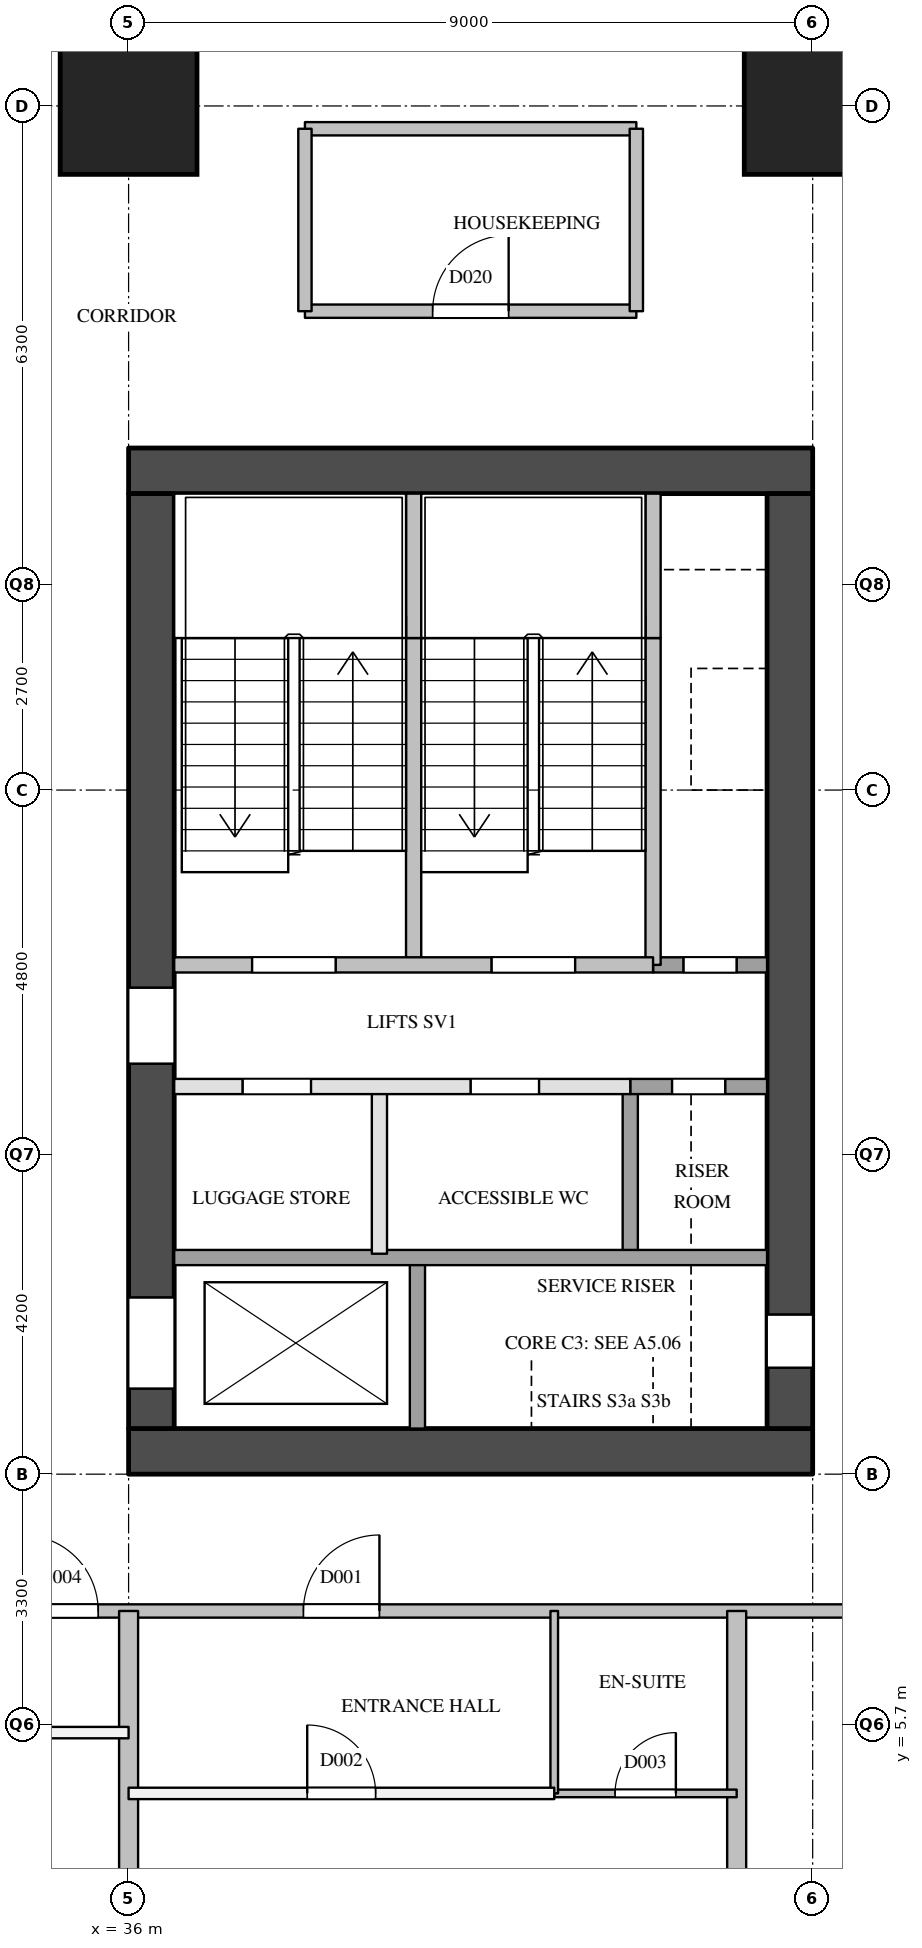
"""IFC4 building model, lengths in metres.
Left out: names, types, materials, properties, quantities, classifications, styles, units other than length and angle.
Written with IfcOpenShell. Run it as: python <this file> out.ifc"""

import sys

from ifc_helpers import new_model, si_unit, direction, frame, frame_2d, origin, origin_2d, place, context, subcontext, project, spatial, rectangle, extrude, element, fill, save


model = new_model("IFC4")
c1 = context("Model", 3, precision=1e-05, world=origin(), true_north=direction((0.0, 1.0)))
c2 = subcontext(c1, "Body", "Model", "MODEL_VIEW")
j1 = project(units=[si_unit("LENGTHUNIT", "METRE"), si_unit("PLANEANGLEUNIT", "RADIAN")], contexts=[c1])
p1 = place(None, origin())
s1 = spatial("IfcSite", under=j1, at=p1, CompositionType="ELEMENT")
p2 = place(p1, origin())
s2 = spatial("IfcBuilding", under=s1, at=p2, CompositionType="ELEMENT")
p3 = place(p2, frame((0.0, 0.0, 108.2)))
s3 = spatial("IfcBuildingStorey", under=s2, at=p3, CompositionType="ELEMENT", Elevation=108.2)
for number, where, z_axis, x_axis in (
    (1, (36.0, 27.0, 0.0), (0.0, 0.0, 1.0), (1.0, 0.0, 0.0)),
    (2, (45.0, 27.0, 0.0), (0.0, 0.0, 1.0), (1.0, 0.0, 0.0)),
):
    element("IfcColumn", number, at=place(p3, frame(where, z_axis=z_axis, x_axis=x_axis)), inside=s3, PredefinedType="COLUMN", context=c2, shape_type="SweptSolid", body=[
        extrude(rectangle(XDim=1.8, YDim=1.8, at=origin_2d()), origin(), (0.0, 0.0, 1.0), 3.8),
    ])
for number, where, z_axis, x_axis in (
    (3, (36.0, 9.3, 0.0), (0.0, 0.0, 1.0), (1.0, 0.0, 0.0)),
    (4, (36.0, 22.2, 0.0), (0.0, 0.0, 1.0), (1.0, 0.0, 0.0)),
):
    element("IfcWall", number, at=place(p3, frame(where, z_axis=z_axis, x_axis=x_axis)), inside=s3, PredefinedType="SHEAR", context=c2, shape_type="SweptSolid", body=[
        extrude(rectangle(XDim=9.0, YDim=0.6, at=frame_2d((4.5, 0.0))), origin(), (0.0, 0.0, 1.0), 3.5),
    ])
p4 = place(p3, frame((36.3, 9.6, 0.0), z_axis=(0.0, 0.0, 1.0), x_axis=(0.0, 1.0, 0.0)))
e5 = element("IfcWall", 5, at=p4, inside=s3, PredefinedType="SHEAR", context=c2, shape_type="SweptSolid", body=[
    extrude(rectangle(XDim=12.3, YDim=0.6, at=frame_2d((6.15, 0.0))), origin(), (0.0, 0.0, 1.0), 3.5),
])
p5 = place(p4, frame((0.525, 0.0, 0.0)))
e6 = element("IfcOpeningElement", 6, at=p5, cuts=e5, PredefinedType="OPENING", context=c2, shape_type="SweptSolid", body=[
    extrude(rectangle(XDim=1.2, YDim=2.1, at=frame_2d((0.6, 1.05))), frame((0.0, 0.31, 0.0), z_axis=(0.0, -1.0, 0.0), x_axis=(1.0, 0.0, 0.0)), (0.0, 0.0, 1.0), 0.62),
])
p6 = place(p4, frame((4.8, 0.0, 0.0)))
e7 = element("IfcOpeningElement", 7, at=p6, cuts=e5, PredefinedType="OPENING", context=c2, shape_type="SweptSolid", body=[
    extrude(rectangle(XDim=1.0, YDim=2.1, at=frame_2d((0.5, 1.05))), frame((0.0, 0.31, 0.0), z_axis=(0.0, -1.0, 0.0), x_axis=(1.0, 0.0, 0.0)), (0.0, 0.0, 1.0), 0.62),
])
p7 = place(p3, frame((44.7, 9.6, 0.0), z_axis=(0.0, 0.0, 1.0), x_axis=(0.0, 1.0, 0.0)))
e8 = element("IfcWall", 8, at=p7, inside=s3, PredefinedType="SHEAR", context=c2, shape_type="SweptSolid", body=[
    extrude(rectangle(XDim=12.3, YDim=0.6, at=frame_2d((6.15, 0.0))), origin(), (0.0, 0.0, 1.0), 3.5),
])
p8 = place(p7, frame((0.8, 0.0, 0.0)))
e9 = element("IfcOpeningElement", 9, at=p8, cuts=e8, PredefinedType="OPENING", context=c2, shape_type="SweptSolid", body=[
    extrude(rectangle(XDim=0.7, YDim=2.1, at=frame_2d((0.35, 1.05))), frame((0.0, 0.31, 0.0), z_axis=(0.0, -1.0, 0.0), x_axis=(1.0, 0.0, 0.0)), (0.0, 0.0, 1.0), 0.62),
])
p9 = place(p3, frame((39.3, 11.9, 0.0), z_axis=(0.0, 0.0, 1.0), x_axis=(0.0, 1.0, 0.0)))
e10 = element("IfcWall", 10, at=p9, inside=s3, PredefinedType="PARTITIONING", context=c2, shape_type="SweptSolid", body=[
    extrude(rectangle(XDim=2.2, YDim=0.2, at=frame_2d((1.1, 0.0))), origin(), (0.0, 0.0, 1.0), 3.5),
])
p10 = place(p3, frame((39.75, 15.7, 0.0), z_axis=(0.0, 0.0, 1.0), x_axis=(0.0, 1.0, 0.0)))
e11 = element("IfcWall", 11, at=p10, inside=s3, PredefinedType="SOLIDWALL", context=c2, shape_type="SweptSolid", body=[
    extrude(rectangle(XDim=4.3, YDim=0.2, at=frame_2d((2.15, 0.0))), origin(), (0.0, 0.0, 1.0), 3.5),
])
p11 = place(p3, frame((39.75, 20.0, 0.0), z_axis=(0.0, 0.0, 1.0), x_axis=(0.0, 1.0, 0.0)))
e12 = element("IfcWall", 12, at=p11, inside=s3, PredefinedType="SOLIDWALL", context=c2, shape_type="SweptSolid", body=[
    extrude(rectangle(XDim=1.9, YDim=0.2, at=frame_2d((0.95, 0.0))), origin(), (0.0, 0.0, 1.0), 3.5),
])
p12 = place(p3, frame((39.8, 9.6, 0.0), z_axis=(0.0, 0.0, 1.0), x_axis=(0.0, 1.0, 0.0)))
e13 = element("IfcWall", 13, at=p12, inside=s3, PredefinedType="SOLIDWALL", context=c2, shape_type="SweptSolid", body=[
    extrude(rectangle(XDim=2.3, YDim=0.2, at=frame_2d((1.15, 0.0))), origin(), (0.0, 0.0, 1.0), 3.5),
])
p13 = place(p3, frame((42.6, 11.9, 0.0), z_axis=(0.0, 0.0, 1.0), x_axis=(0.0, 1.0, 0.0)))
e14 = element("IfcWall", 14, at=p13, inside=s3, PredefinedType="SOLIDWALL", context=c2, shape_type="SweptSolid", body=[
    extrude(rectangle(XDim=2.2, YDim=0.2, at=frame_2d((1.1, 0.0))), origin(), (0.0, 0.0, 1.0), 3.5),
])
p14 = place(p3, frame((42.9, 15.7, 0.0), z_axis=(0.0, 0.0, 1.0), x_axis=(0.0, 1.0, 0.0)))
e15 = element("IfcWall", 15, at=p14, inside=s3, PredefinedType="SOLIDWALL", context=c2, shape_type="SweptSolid", body=[
    extrude(rectangle(XDim=4.3, YDim=0.2, at=frame_2d((2.15, 0.0))), origin(), (0.0, 0.0, 1.0), 3.5),
])
p15 = place(p3, frame((42.9, 20.0, 0.0), z_axis=(0.0, 0.0, 1.0), x_axis=(0.0, 1.0, 0.0)))
e16 = element("IfcWall", 16, at=p15, inside=s3, PredefinedType="SOLIDWALL", context=c2, shape_type="SweptSolid", body=[
    extrude(rectangle(XDim=1.9, YDim=0.2, at=frame_2d((0.95, 0.0))), origin(), (0.0, 0.0, 1.0), 3.5),
])
p16 = place(p3, frame((36.6, 11.85, 0.0), z_axis=(0.0, 0.0, 1.0), x_axis=(1.0, 0.0, 0.0)))
e17 = element("IfcWall", 17, at=p16, inside=s3, PredefinedType="SOLIDWALL", context=c2, shape_type="SweptSolid", body=[
    extrude(rectangle(XDim=7.8, YDim=0.2, at=frame_2d((3.9, 0.0))), origin(), (0.0, 0.0, 1.0), 3.5),
])
p17 = place(p3, frame((36.6, 14.1, 0.0), z_axis=(0.0, 0.0, 1.0), x_axis=(1.0, 0.0, 0.0)))
e18 = element("IfcWall", 18, at=p17, inside=s3, PredefinedType="PARTITIONING", context=c2, shape_type="SweptSolid", body=[
    extrude(rectangle(XDim=6.0, YDim=0.2, at=frame_2d((3.0, 0.0))), origin(), (0.0, 0.0, 1.0), 3.5),
])
p18 = place(p17, frame((0.9, 0.0, 0.0)))
e19 = element("IfcOpeningElement", 19, at=p18, cuts=e18, PredefinedType="OPENING", context=c2, shape_type="SweptSolid", body=[
    extrude(rectangle(XDim=0.9, YDim=2.1, at=frame_2d((0.45, 1.05))), frame((0.0, 0.11, 0.0), z_axis=(0.0, -1.0, 0.0), x_axis=(1.0, 0.0, 0.0)), (0.0, 0.0, 1.0), 0.22),
])
p19 = place(p17, frame((3.9, 0.0, 0.0)))
e20 = element("IfcOpeningElement", 20, at=p19, cuts=e18, PredefinedType="OPENING", context=c2, shape_type="SweptSolid", body=[
    extrude(rectangle(XDim=0.9, YDim=2.1, at=frame_2d((0.45, 1.05))), frame((0.0, 0.11, 0.0), z_axis=(0.0, -1.0, 0.0), x_axis=(1.0, 0.0, 0.0)), (0.0, 0.0, 1.0), 0.22),
])
p20 = place(p3, frame((42.6, 14.1, 0.0), z_axis=(0.0, 0.0, 1.0), x_axis=(1.0, 0.0, 0.0)))
e21 = element("IfcWall", 21, at=p20, inside=s3, PredefinedType="SOLIDWALL", context=c2, shape_type="SweptSolid", body=[
    extrude(rectangle(XDim=1.8, YDim=0.2, at=frame_2d((0.9, 0.0))), origin(), (0.0, 0.0, 1.0), 3.5),
])
p21 = place(p20, frame((0.55, 0.0, 0.0)))
e22 = element("IfcOpeningElement", 22, at=p21, cuts=e21, PredefinedType="OPENING", context=c2, shape_type="SweptSolid", body=[
    extrude(rectangle(XDim=0.7, YDim=2.1, at=frame_2d((0.35, 1.05))), frame((0.0, 0.11, 0.0), z_axis=(0.0, -1.0, 0.0), x_axis=(1.0, 0.0, 0.0)), (0.0, 0.0, 1.0), 0.22),
])
p22 = place(p3, frame((42.9, 15.7, 0.0), z_axis=(0.0, 0.0, 1.0), x_axis=(1.0, 0.0, 0.0)))
e23 = element("IfcWall", 23, at=p22, inside=s3, PredefinedType="SOLIDWALL", context=c2, shape_type="SweptSolid", body=[
    extrude(rectangle(XDim=1.5, YDim=0.2, at=frame_2d((0.75, 0.0))), origin(), (0.0, 0.0, 1.0), 3.5),
])
p23 = place(p22, frame((0.4, 0.0, 0.0)))
e24 = element("IfcOpeningElement", 24, at=p23, cuts=e23, PredefinedType="OPENING", context=c2, shape_type="SweptSolid", body=[
    extrude(rectangle(XDim=0.7, YDim=2.1, at=frame_2d((0.35, 1.05))), frame((0.0, 0.11, 0.0), z_axis=(0.0, -1.0, 0.0), x_axis=(1.0, 0.0, 0.0)), (0.0, 0.0, 1.0), 0.22),
])
p24 = place(p3, frame((36.6, 15.7, 0.0), z_axis=(0.0, 0.0, 1.0), x_axis=(1.0, 0.0, 0.0)))
e25 = element("IfcWall", 25, at=p24, inside=s3, PredefinedType="SOLIDWALL", context=c2, shape_type="SweptSolid", body=[
    extrude(rectangle(XDim=6.3, YDim=0.2, at=frame_2d((3.15, 0.0))), origin(), (0.0, 0.0, 1.0), 3.5),
])
p25 = place(p24, frame((1.025, 0.0, 0.0)))
e26 = element("IfcOpeningElement", 26, at=p25, cuts=e25, PredefinedType="OPENING", context=c2, shape_type="SweptSolid", body=[
    extrude(rectangle(XDim=1.1, YDim=2.1, at=frame_2d((0.55, 1.05))), frame((0.0, 0.11, 0.0), z_axis=(0.0, -1.0, 0.0), x_axis=(1.0, 0.0, 0.0)), (0.0, 0.0, 1.0), 0.22),
])
p26 = place(p24, frame((4.175, 0.0, 0.0)))
e27 = element("IfcOpeningElement", 27, at=p26, cuts=e25, PredefinedType="OPENING", context=c2, shape_type="SweptSolid", body=[
    extrude(rectangle(XDim=1.1, YDim=2.1, at=frame_2d((0.55, 1.05))), frame((0.0, 0.11, 0.0), z_axis=(0.0, -1.0, 0.0), x_axis=(1.0, 0.0, 0.0)), (0.0, 0.0, 1.0), 0.22),
])
p27 = place(p3, frame((34.2, 7.2, 0.0), z_axis=(0.0, 0.0, 1.0), x_axis=(1.0, 0.0, 0.0)))
e28 = element("IfcWall", 28, at=p27, inside=s3, PredefinedType="PARTITIONING", context=c2, shape_type="SweptSolid", body=[
    extrude(rectangle(XDim=12.6, YDim=0.175, at=frame_2d((6.3, 0.0))), origin(), (0.0, 0.0, 1.0), 3.5),
])
p28 = place(p27, frame((4.1, 0.0, 0.0)))
e29 = element("IfcOpeningElement", 29, at=p28, cuts=e28, PredefinedType="OPENING", context=c2, shape_type="SweptSolid", body=[
    extrude(rectangle(XDim=1.0, YDim=2.1, at=frame_2d((0.5, 1.05))), frame((0.0, 0.097, 0.0), z_axis=(0.0, -1.0, 0.0), x_axis=(1.0, 0.0, 0.0)), (0.0, 0.0, 1.0), 0.195),
])
p29 = place(p27, frame((0.4, 0.0, 0.0)))
e30 = element("IfcOpeningElement", 30, at=p29, cuts=e28, PredefinedType="OPENING", context=c2, shape_type="SweptSolid", body=[
    extrude(rectangle(XDim=1.0, YDim=2.1, at=frame_2d((0.5, 1.05))), frame((0.0, 0.097, 0.0), z_axis=(0.0, -1.0, 0.0), x_axis=(1.0, 0.0, 0.0)), (0.0, 0.0, 1.0), 0.195),
])
p30 = place(p3, frame((38.32, 24.3, 0.0), z_axis=(0.0, 0.0, 1.0), x_axis=(1.0, 0.0, 0.0)))
e31 = element("IfcWall", 31, at=p30, inside=s3, PredefinedType="PARTITIONING", context=c2, shape_type="SweptSolid", body=[
    extrude(rectangle(XDim=4.36, YDim=0.175, at=frame_2d((2.18, 0.0))), origin(), (0.0, 0.0, 1.0), 3.5),
])
p31 = place(p30, frame((1.68, 0.0, 0.0)))
e32 = element("IfcOpeningElement", 32, at=p31, cuts=e31, PredefinedType="OPENING", context=c2, shape_type="SweptSolid", body=[
    extrude(rectangle(XDim=1.0, YDim=2.1, at=frame_2d((0.5, 1.05))), frame((0.0, 0.097, 0.0), z_axis=(0.0, -1.0, 0.0), x_axis=(1.0, 0.0, 0.0)), (0.0, 0.0, 1.0), 0.195),
])
p32 = place(p3, frame((38.32, 26.7, 0.0), z_axis=(0.0, 0.0, 1.0), x_axis=(1.0, 0.0, 0.0)))
e33 = element("IfcWall", 33, at=p32, inside=s3, PredefinedType="PARTITIONING", context=c2, shape_type="SweptSolid", body=[
    extrude(rectangle(XDim=4.36, YDim=0.175, at=frame_2d((2.18, 0.0))), origin(), (0.0, 0.0, 1.0), 2.5),
])
for number, where, z_axis, x_axis in (
    (34, (38.32, 24.3, 0.0), (0.0, 0.0, 1.0), (0.0, 1.0, 0.0)),
    (35, (42.68, 24.3, 0.0), (0.0, 0.0, 1.0), (0.0, 1.0, 0.0)),
):
    element("IfcWall", number, at=place(p3, frame(where, z_axis=z_axis, x_axis=x_axis)), inside=s3, PredefinedType="PARTITIONING", context=c2, shape_type="SweptSolid", body=[
        extrude(rectangle(XDim=2.4, YDim=0.175, at=frame_2d((1.2, 0.0))), origin(), (0.0, 0.0, 1.0), 2.5),
    ])
p33 = place(p3, frame((36.0, 4.8, 0.0), z_axis=(0.0, 0.0, 1.0), x_axis=(1.0, 0.0, 0.0)))
e36 = element("IfcWall", 36, at=p33, inside=s3, PredefinedType="PARTITIONING", context=c2, shape_type="SweptSolid", body=[
    extrude(rectangle(XDim=5.6, YDim=0.15, at=frame_2d((2.8, 0.0))), origin(), (0.0, 0.0, 1.0), 3.5),
])
p34 = place(p33, frame((2.35, 0.0, 0.0)))
e37 = element("IfcOpeningElement", 37, at=p34, cuts=e36, PredefinedType="OPENING", context=c2, shape_type="SweptSolid", body=[
    extrude(rectangle(XDim=0.9, YDim=2.1, at=frame_2d((0.45, 1.05))), frame((0.0, 0.085, 0.0), z_axis=(0.0, -1.0, 0.0), x_axis=(1.0, 0.0, 0.0)), (0.0, 0.0, 1.0), 0.17),
])
p35 = place(p3, frame((29.4, 5.6, 0.0), z_axis=(0.0, 0.0, 1.0), x_axis=(1.0, 0.0, 0.0)))
e38 = element("IfcWall", 38, at=p35, inside=s3, PredefinedType="PARTITIONING", context=c2, shape_type="SweptSolid", body=[
    extrude(rectangle(XDim=6.6, YDim=0.15, at=frame_2d((3.3, 0.0))), origin(), (0.0, 0.0, 1.0), 3.5),
])
p36 = place(p35, frame((2.85, 0.0, 0.0)))
e39 = element("IfcOpeningElement", 39, at=p36, cuts=e38, PredefinedType="OPENING", context=c2, shape_type="SweptSolid", body=[
    extrude(rectangle(XDim=0.9, YDim=2.1, at=frame_2d((0.45, 1.05))), frame((0.0, 0.085, 0.0), z_axis=(0.0, -1.0, 0.0), x_axis=(1.0, 0.0, 0.0)), (0.0, 0.0, 1.0), 0.17),
])
p37 = place(p3, frame((36.0, 0.0, 0.0), z_axis=(0.0, 0.0, 1.0), x_axis=(0.0, 1.0, 0.0)))
e40 = element("IfcWall", 40, at=p37, inside=s3, PredefinedType="PARTITIONING", context=c2, shape_type="SweptSolid", body=[
    extrude(rectangle(XDim=7.2, YDim=0.25, at=frame_2d((3.6, 0.0))), origin(), (0.0, 0.0, 1.0), 3.5),
])
p38 = place(p3, frame((44.0, 0.0, 0.0), z_axis=(0.0, 0.0, 1.0), x_axis=(0.0, 1.0, 0.0)))
e41 = element("IfcWall", 41, at=p38, inside=s3, PredefinedType="PARTITIONING", context=c2, shape_type="SweptSolid", body=[
    extrude(rectangle(XDim=7.2, YDim=0.25, at=frame_2d((3.6, 0.0))), origin(), (0.0, 0.0, 1.0), 2.5),
])
p39 = place(p3, frame((41.6, 4.8, 0.0), z_axis=(0.0, 0.0, 1.0), x_axis=(1.0, 0.0, 0.0)))
e42 = element("IfcWall", 42, at=p39, inside=s3, PredefinedType="PARTITIONING", context=c2, shape_type="SweptSolid", body=[
    extrude(rectangle(XDim=2.4, YDim=0.1, at=frame_2d((1.2, 0.0))), origin(), (0.0, 0.0, 1.0), 3.5),
])
p40 = place(p39, frame((0.8, 0.0, 0.0)))
e43 = element("IfcOpeningElement", 43, at=p40, cuts=e42, PredefinedType="OPENING", context=c2, shape_type="SweptSolid", body=[
    extrude(rectangle(XDim=0.8, YDim=2.1, at=frame_2d((0.4, 1.05))), frame((0.0, 0.06, 0.0), z_axis=(0.0, -1.0, 0.0), x_axis=(1.0, 0.0, 0.0)), (0.0, 0.0, 1.0), 0.12),
])
p41 = place(p3, frame((41.6, 4.8, 0.0), z_axis=(0.0, 0.0, 1.0), x_axis=(0.0, 1.0, 0.0)))
e44 = element("IfcWall", 44, at=p41, inside=s3, PredefinedType="PARTITIONING", context=c2, shape_type="SweptSolid", body=[
    extrude(rectangle(XDim=2.4, YDim=0.1, at=frame_2d((1.2, 0.0))), origin(), (0.0, 0.0, 1.0), 3.5),
])
p42 = place(p5, origin())
e45 = element("IfcDoor", 45, at=p42, inside=s3, OperationType="SLIDING_TO_LEFT", PredefinedType="DOOR", context=c2, shape_type="SweptSolid", body=[
    extrude(rectangle(XDim=1.2, YDim=2.1, at=frame_2d((0.6, 1.05))), frame((0.0, 0.025, 0.0), z_axis=(0.0, -1.0, 0.0), x_axis=(1.0, 0.0, 0.0)), (0.0, 0.0, 1.0), 0.05),
])
fill(e6, e45)
p43 = place(p25, origin())
e46 = element("IfcDoor", 46, at=p43, inside=s3, OperationType="SINGLE_SWING_LEFT", PredefinedType="DOOR", context=c2, shape_type="SweptSolid", body=[
    extrude(rectangle(XDim=1.1, YDim=2.1, at=frame_2d((0.55, 1.05))), frame((0.0, 0.025, 0.0), z_axis=(0.0, -1.0, 0.0), x_axis=(1.0, 0.0, 0.0)), (0.0, 0.0, 1.0), 0.05),
])
fill(e26, e46)
p44 = place(p26, origin())
e47 = element("IfcDoor", 47, at=p44, inside=s3, OperationType="SINGLE_SWING_RIGHT", PredefinedType="DOOR", context=c2, shape_type="SweptSolid", body=[
    extrude(rectangle(XDim=1.1, YDim=2.1, at=frame_2d((0.55, 1.05))), frame((0.0, 0.025, 0.0), z_axis=(0.0, -1.0, 0.0), x_axis=(1.0, 0.0, 0.0)), (0.0, 0.0, 1.0), 0.05),
])
fill(e27, e47)
p45 = place(p23, origin())
e48 = element("IfcDoor", 48, at=p45, inside=s3, OperationType="SINGLE_SWING_LEFT", PredefinedType="DOOR", context=c2, shape_type="SweptSolid", body=[
    extrude(rectangle(XDim=0.7, YDim=2.1, at=frame_2d((0.35, 1.05))), frame((0.0, 0.025, 0.0), z_axis=(0.0, -1.0, 0.0), x_axis=(1.0, 0.0, 0.0)), (0.0, 0.0, 1.0), 0.05),
])
fill(e24, e48)
p46 = place(p21, origin())
e49 = element("IfcDoor", 49, at=p46, inside=s3, OperationType="SINGLE_SWING_RIGHT", PredefinedType="DOOR", context=c2, shape_type="SweptSolid", body=[
    extrude(rectangle(XDim=0.7, YDim=2.1, at=frame_2d((0.35, 1.05))), frame((0.0, 0.025, 0.0), z_axis=(0.0, -1.0, 0.0), x_axis=(1.0, 0.0, 0.0)), (0.0, 0.0, 1.0), 0.05),
])
fill(e22, e49)
p47 = place(p8, origin())
e50 = element("IfcDoor", 50, at=p47, inside=s3, OperationType="SINGLE_SWING_LEFT", PredefinedType="DOOR", context=c2, shape_type="SweptSolid", body=[
    extrude(rectangle(XDim=0.7, YDim=2.1, at=frame_2d((0.35, 1.05))), frame((0.0, 0.025, 0.0), z_axis=(0.0, -1.0, 0.0), x_axis=(1.0, 0.0, 0.0)), (0.0, 0.0, 1.0), 0.05),
])
fill(e9, e50)
p48 = place(p6, origin())
e51 = element("IfcDoor", 51, at=p48, inside=s3, OperationType="SINGLE_SWING_LEFT", PredefinedType="DOOR", context=c2, shape_type="SweptSolid", body=[
    extrude(rectangle(XDim=1.0, YDim=2.1, at=frame_2d((0.5, 1.05))), frame((0.0, 0.025, 0.0), z_axis=(0.0, -1.0, 0.0), x_axis=(1.0, 0.0, 0.0)), (0.0, 0.0, 1.0), 0.05),
])
fill(e7, e51)
p49 = place(p18, origin())
e52 = element("IfcDoor", 52, at=p49, inside=s3, OperationType="SINGLE_SWING_LEFT", PredefinedType="DOOR", context=c2, shape_type="SweptSolid", body=[
    extrude(rectangle(XDim=0.9, YDim=2.1, at=frame_2d((0.45, 1.05))), frame((0.0, 0.025, 0.0), z_axis=(0.0, -1.0, 0.0), x_axis=(1.0, 0.0, 0.0)), (0.0, 0.0, 1.0), 0.05),
])
fill(e19, e52)
p50 = place(p19, origin())
e53 = element("IfcDoor", 53, at=p50, inside=s3, OperationType="SINGLE_SWING_RIGHT", PredefinedType="DOOR", context=c2, shape_type="SweptSolid", body=[
    extrude(rectangle(XDim=0.9, YDim=2.1, at=frame_2d((0.45, 1.05))), frame((0.0, 0.025, 0.0), z_axis=(0.0, -1.0, 0.0), x_axis=(1.0, 0.0, 0.0)), (0.0, 0.0, 1.0), 0.05),
])
fill(e20, e53)
p51 = place(p28, origin())
e54 = element("IfcDoor", 54, at=p51, inside=s3, OperationType="SINGLE_SWING_RIGHT", PredefinedType="DOOR", context=c2, shape_type="SweptSolid", body=[
    extrude(rectangle(XDim=1.0, YDim=2.1, at=frame_2d((0.5, 1.05))), frame((0.0, 0.025, 0.0), z_axis=(0.0, -1.0, 0.0), x_axis=(1.0, 0.0, 0.0)), (0.0, 0.0, 1.0), 0.05),
])
fill(e29, e54)
p52 = place(p34, origin())
e55 = element("IfcDoor", 55, at=p52, inside=s3, OperationType="SINGLE_SWING_LEFT", PredefinedType="DOOR", context=c2, shape_type="SweptSolid", body=[
    extrude(rectangle(XDim=0.9, YDim=2.1, at=frame_2d((0.45, 1.05))), frame((0.0, 0.025, 0.0), z_axis=(0.0, -1.0, 0.0), x_axis=(1.0, 0.0, 0.0)), (0.0, 0.0, 1.0), 0.05),
])
fill(e37, e55)
p53 = place(p40, origin())
e56 = element("IfcDoor", 56, at=p53, inside=s3, OperationType="SINGLE_SWING_RIGHT", PredefinedType="DOOR", context=c2, shape_type="SweptSolid", body=[
    extrude(rectangle(XDim=0.8, YDim=2.1, at=frame_2d((0.4, 1.05))), frame((0.0, 0.025, 0.0), z_axis=(0.0, -1.0, 0.0), x_axis=(1.0, 0.0, 0.0)), (0.0, 0.0, 1.0), 0.05),
])
fill(e43, e56)
p54 = place(p29, origin())
e57 = element("IfcDoor", 57, at=p54, inside=s3, OperationType="SINGLE_SWING_LEFT", PredefinedType="DOOR", context=c2, shape_type="SweptSolid", body=[
    extrude(rectangle(XDim=1.0, YDim=2.1, at=frame_2d((0.5, 1.05))), frame((0.0, 0.025, 0.0), z_axis=(0.0, -1.0, 0.0), x_axis=(1.0, 0.0, 0.0)), (0.0, 0.0, 1.0), 0.05),
])
fill(e30, e57)
p55 = place(p31, origin())
e58 = element("IfcDoor", 58, at=p55, inside=s3, OperationType="SINGLE_SWING_RIGHT", PredefinedType="DOOR", context=c2, shape_type="SweptSolid", body=[
    extrude(rectangle(XDim=1.0, YDim=2.1, at=frame_2d((0.5, 1.05))), frame((0.0, 0.025, 0.0), z_axis=(0.0, -1.0, 0.0), x_axis=(1.0, 0.0, 0.0)), (0.0, 0.0, 1.0), 0.05),
])
fill(e32, e58)
save(model, sys.argv[1])
